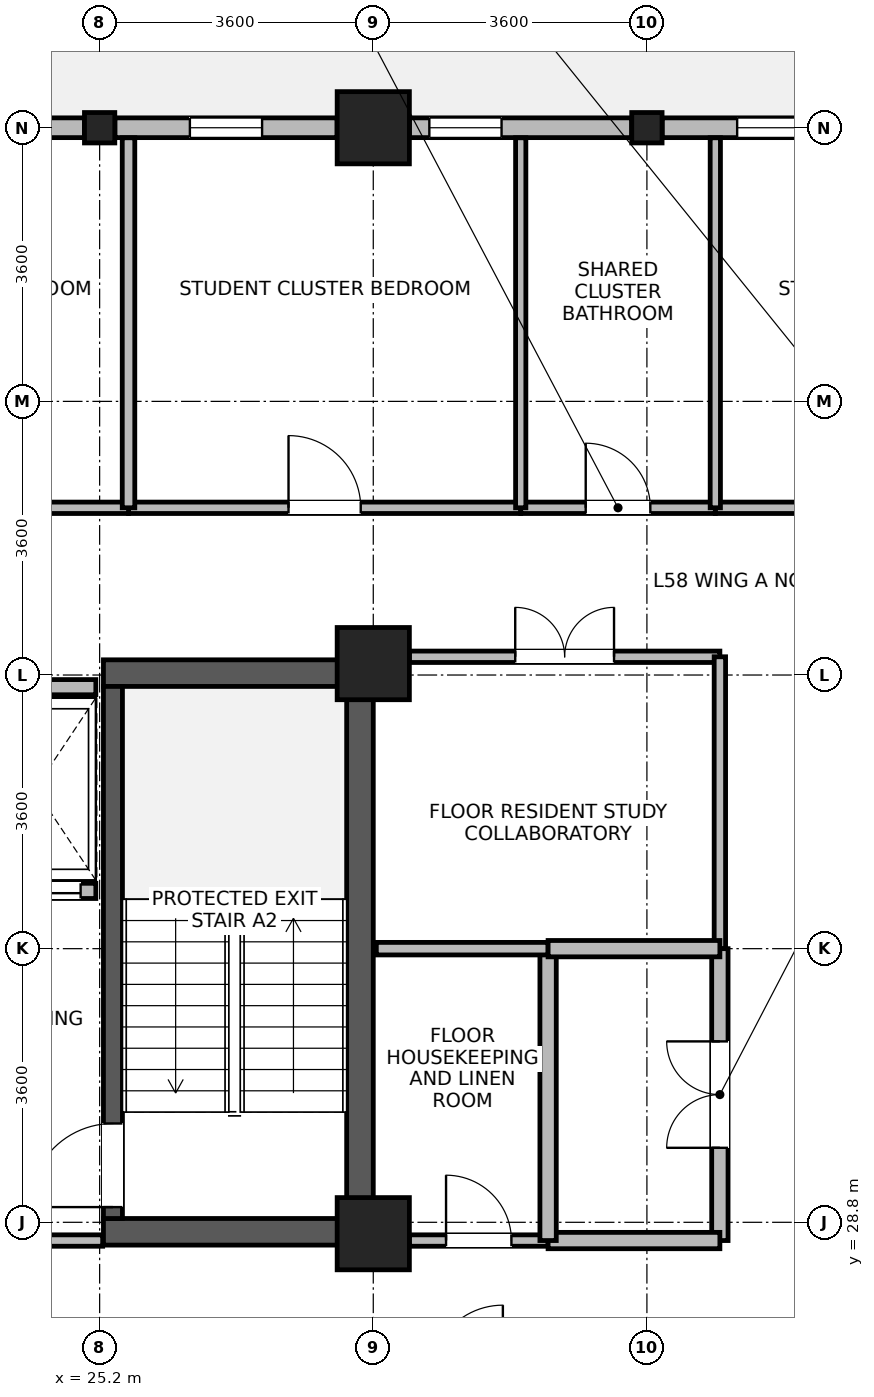
"""IFC4 building model, lengths in metres.
Left out: names, types, materials, properties, quantities, classifications, styles, units other than length and angle.
Written with IfcOpenShell. Run it as: python <this file> out.ifc"""

import sys

from ifc_helpers import new_model, si_unit, direction, frame, frame_2d, origin, origin_2d, place, context, subcontext, project, spatial, rectangle, i_section, extrude, source, transform, mapped, element, fill, save


model = new_model("IFC4")
c1 = context("Model", 3, precision=1e-05, world=origin(), true_north=direction((0.0, 1.0)))
c2 = subcontext(c1, "Body", "Model", "MODEL_VIEW")
j1 = project(units=[si_unit("LENGTHUNIT", "METRE"), si_unit("PLANEANGLEUNIT", "RADIAN")], contexts=[c1])
p1 = place(None, origin())
s1 = spatial("IfcSite", under=j1, at=p1, CompositionType="ELEMENT")
p2 = place(p1, origin())
s2 = spatial("IfcBuilding", under=s1, at=p2, CompositionType="ELEMENT")
p3 = place(p2, frame((0.0, 0.0, 227.7)))
s3 = spatial("IfcBuildingStorey", under=s2, at=p3, CompositionType="ELEMENT", Elevation=227.7)
p4 = place(p3, frame((28.625, 28.5, 0.0), z_axis=(0.0, 0.0, 1.0), x_axis=(0.0, 1.0, 0.0)))
e1 = element("IfcWall", 1, at=p4, inside=s3, PredefinedType="SHEAR", context=c2, shape_type="SweptSolid", body=[
    extrude(rectangle(XDim=7.7, YDim=0.35, at=frame_2d((3.85, 0.0))), origin(), (0.0, 0.0, 1.0), 3.47),
])
for number, where, z_axis, x_axis in (
    (2, (25.25, 28.675, 0.0), (0.0, 0.0, 1.0), (1.0, 0.0, 0.0)),
    (3, (25.25, 36.025, 0.0), (0.0, 0.0, 1.0), (1.0, 0.0, 0.0)),
):
    element("IfcWall", number, at=place(p3, frame(where, z_axis=z_axis, x_axis=x_axis)), inside=s3, PredefinedType="SHEAR", context=c2, shape_type="SweptSolid", body=[
        extrude(rectangle(XDim=3.2, YDim=0.35, at=frame_2d((1.6, 0.0))), origin(), (0.0, 0.0, 1.0), 3.47),
    ])
p5 = place(p3, frame((25.375, 28.85, 0.0), z_axis=(0.0, 0.0, 1.0), x_axis=(0.0, 1.0, 0.0)))
e4 = element("IfcWall", 4, at=p5, inside=s3, PredefinedType="SHEAR", context=c2, shape_type="SweptSolid", body=[
    extrude(rectangle(XDim=7.0, YDim=0.25, at=frame_2d((3.5, 0.0))), origin(), (0.0, 0.0, 1.0), 3.47),
])
p6 = place(p5, frame((0.15, 0.0, 0.0)))
e5 = element("IfcOpeningElement", 5, at=p6, cuts=e4, PredefinedType="OPENING", context=c2, shape_type="SweptSolid", body=[
    extrude(rectangle(XDim=1.1, YDim=2.08, at=frame_2d((0.55, 1.04))), frame((0.0, 0.135, 0.0), z_axis=(0.0, -1.0, 0.0), x_axis=(1.0, 0.0, 0.0)), (0.0, 0.0, 1.0), 0.27),
])
m1 = source(origin(), c2, "Body", "SweptSolid", [
    extrude(rectangle(XDim=0.95, YDim=0.95, at=origin_2d()), origin(), (0.0, 0.0, 1.0), 3.7),
])
for number, where, z_axis, x_axis in (
    (6, (28.8, 28.65, 0.0), (0.0, 0.0, 1.0), (1.0, 0.0, 0.0)),
    (7, (28.8, 36.15, 0.0), (0.0, 0.0, 1.0), (1.0, 0.0, 0.0)),
    (8, (28.8, 43.2, 0.0), (0.0, 0.0, 1.0), (1.0, 0.0, 0.0)),
):
    element("IfcColumn", number, at=place(p3, frame(where, z_axis=z_axis, x_axis=x_axis)), inside=s3, PredefinedType="COLUMN", context=c2, shape_type="MappedRepresentation", body=[
        mapped(m1, transform((0.0, 0.0, 0.0), x_axis=(1.0, 0.0, 0.0), y_axis=(0.0, 1.0, 0.0), z_axis=(0.0, 0.0, 1.0), scale=1.0)),
    ])
m2 = source(origin(), c2, "Body", "SweptSolid", [
    extrude(i_section(OverallWidth=0.399, OverallDepth=0.4, WebThickness=0.017, FlangeThickness=0.023, FilletRadius=0.015, at=origin_2d()), origin(), (0.0, 0.0, 1.0), 3.7),
])
for number, where, z_axis, x_axis in (
    (9, (25.2, 43.2, 0.0), (0.0, 0.0, 1.0), (1.0, 0.0, 0.0)),
    (10, (32.4, 43.2, 0.0), (0.0, 0.0, 1.0), (1.0, 0.0, 0.0)),
):
    element("IfcColumn", number, at=place(p3, frame(where, z_axis=z_axis, x_axis=x_axis)), inside=s3, PredefinedType="COLUMN", context=c2, shape_type="MappedRepresentation", body=[
        mapped(m2, transform((0.0, 0.0, 0.0), x_axis=(1.0, 0.0, 0.0), y_axis=(0.0, 1.0, 0.0), z_axis=(0.0, 0.0, 1.0), scale=1.0)),
    ])
p7 = place(p3, frame((32.601, 43.2, 0.0), z_axis=(0.0, 0.0, 1.0), x_axis=(1.0, 0.0, 0.0)))
e11 = element("IfcWall", 11, at=p7, inside=s3, PredefinedType="STANDARD", context=c2, shape_type="SweptSolid", body=[
    extrude(rectangle(XDim=2.923, YDim=0.26, at=frame_2d((1.462, 0.0))), origin(), (0.0, 0.0, 1.0), 3.05),
])
p8 = place(p7, frame((0.987, 0.0, 0.85)))
e12 = element("IfcOpeningElement", 12, at=p8, cuts=e11, PredefinedType="OPENING", context=c2, shape_type="SweptSolid", body=[
    extrude(rectangle(XDim=0.95, YDim=1.75, at=frame_2d((0.475, 0.875))), frame((0.0, 0.14, 0.0), z_axis=(0.0, -1.0, 0.0), x_axis=(1.0, 0.0, 0.0)), (0.0, 0.0, 1.0), 0.28),
])
p9 = place(p3, frame((29.276, 43.2, 0.0), z_axis=(0.0, 0.0, 1.0), x_axis=(1.0, 0.0, 0.0)))
e13 = element("IfcWall", 13, at=p9, inside=s3, PredefinedType="STANDARD", context=c2, shape_type="SweptSolid", body=[
    extrude(rectangle(XDim=2.924, YDim=0.26, at=frame_2d((1.462, 0.0))), origin(), (0.0, 0.0, 1.0), 3.05),
])
p10 = place(p9, frame((0.262, 0.0, 0.85)))
e14 = element("IfcOpeningElement", 14, at=p10, cuts=e13, PredefinedType="OPENING", context=c2, shape_type="SweptSolid", body=[
    extrude(rectangle(XDim=0.95, YDim=1.75, at=frame_2d((0.475, 0.875))), frame((0.0, 0.14, 0.0), z_axis=(0.0, -1.0, 0.0), x_axis=(1.0, 0.0, 0.0)), (0.0, 0.0, 1.0), 0.28),
])
p11 = place(p3, frame((25.4, 43.2, 0.0), z_axis=(0.0, 0.0, 1.0), x_axis=(1.0, 0.0, 0.0)))
e15 = element("IfcWall", 15, at=p11, inside=s3, PredefinedType="STANDARD", context=c2, shape_type="SweptSolid", body=[
    extrude(rectangle(XDim=2.924, YDim=0.26, at=frame_2d((1.462, 0.0))), origin(), (0.0, 0.0, 1.0), 3.05),
])
p12 = place(p11, frame((0.987, 0.0, 0.85)))
e16 = element("IfcOpeningElement", 16, at=p12, cuts=e15, PredefinedType="OPENING", context=c2, shape_type="SweptSolid", body=[
    extrude(rectangle(XDim=0.95, YDim=1.75, at=frame_2d((0.475, 0.875))), frame((0.0, 0.14, 0.0), z_axis=(0.0, -1.0, 0.0), x_axis=(1.0, 0.0, 0.0)), (0.0, 0.0, 1.0), 0.28),
])
p13 = place(p3, frame((22.076, 43.2, 0.0), z_axis=(0.0, 0.0, 1.0), x_axis=(1.0, 0.0, 0.0)))
e17 = element("IfcWall", 17, at=p13, inside=s3, PredefinedType="STANDARD", context=c2, shape_type="SweptSolid", body=[
    extrude(rectangle(XDim=2.924, YDim=0.26, at=frame_2d((1.462, 0.0))), origin(), (0.0, 0.0, 1.0), 3.05),
])
p14 = place(p13, frame((0.987, 0.0, 0.85)))
e18 = element("IfcOpeningElement", 18, at=p14, cuts=e17, PredefinedType="OPENING", context=c2, shape_type="SweptSolid", body=[
    extrude(rectangle(XDim=0.95, YDim=1.75, at=frame_2d((0.475, 0.875))), frame((0.0, 0.14, 0.0), z_axis=(0.0, -1.0, 0.0), x_axis=(1.0, 0.0, 0.0)), (0.0, 0.0, 1.0), 0.28),
])
p15 = place(p3, frame((23.55, 33.16, 0.0), z_axis=(0.0, 0.0, 1.0), x_axis=(1.0, 0.0, 0.0)))
e19 = element("IfcWall", 19, at=p15, inside=s3, PredefinedType="PARTITIONING", context=c2, shape_type="SweptSolid", body=[
    extrude(rectangle(XDim=1.6, YDim=0.2, at=frame_2d((0.8, 0.0))), origin(), (0.0, 0.0, 1.0), 3.45),
])
p16 = place(p15, frame((0.2, 0.0, 0.0)))
e20 = element("IfcOpeningElement", 20, at=p16, cuts=e19, PredefinedType="OPENING", context=c2, shape_type="SweptSolid", body=[
    extrude(rectangle(XDim=1.2, YDim=2.12, at=frame_2d((0.6, 1.06))), frame((0.0, 0.11, 0.0), z_axis=(0.0, -1.0, 0.0), x_axis=(1.0, 0.0, 0.0)), (0.0, 0.0, 1.0), 0.22),
])
p17 = place(p3, frame((23.55, 35.84, 0.0), z_axis=(0.0, 0.0, 1.0), x_axis=(1.0, 0.0, 0.0)))
e21 = element("IfcWall", 21, at=p17, inside=s3, PredefinedType="PARTITIONING", context=c2, shape_type="SweptSolid", body=[
    extrude(rectangle(XDim=1.6, YDim=0.2, at=frame_2d((0.8, 0.0))), origin(), (0.0, 0.0, 1.0), 2.55),
])
p18 = place(p3, frame((33.3, 38.2, 0.0), z_axis=(0.0, 0.0, 1.0), x_axis=(1.0, 0.0, 0.0)))
e22 = element("IfcWall", 22, at=p18, inside=s3, PredefinedType="PARTITIONING", context=c2, shape_type="SweptSolid", body=[
    extrude(rectangle(XDim=5.5, YDim=0.15, at=frame_2d((2.75, 0.0))), origin(), (0.0, 0.0, 1.0), 3.45),
])
p19 = place(p18, frame((2.275, 0.0, 0.0)))
e23 = element("IfcOpeningElement", 23, at=p19, cuts=e22, PredefinedType="OPENING", context=c2, shape_type="SweptSolid", body=[
    extrude(rectangle(XDim=0.95, YDim=2.1, at=frame_2d((0.475, 1.05))), frame((0.0, 0.085, 0.0), z_axis=(0.0, -1.0, 0.0), x_axis=(1.0, 0.0, 0.0)), (0.0, 0.0, 1.0), 0.17),
])
p20 = place(p3, frame((25.58, 38.2, 0.0), z_axis=(0.0, 0.0, 1.0), x_axis=(1.0, 0.0, 0.0)))
e24 = element("IfcWall", 24, at=p20, inside=s3, PredefinedType="PARTITIONING", context=c2, shape_type="SweptSolid", body=[
    extrude(rectangle(XDim=5.16, YDim=0.15, at=frame_2d((2.58, 0.0))), origin(), (0.0, 0.0, 1.0), 3.45),
])
p21 = place(p20, frame((2.105, 0.0, 0.0)))
e25 = element("IfcOpeningElement", 25, at=p21, cuts=e24, PredefinedType="OPENING", context=c2, shape_type="SweptSolid", body=[
    extrude(rectangle(XDim=0.95, YDim=2.1, at=frame_2d((0.475, 1.05))), frame((0.0, 0.085, 0.0), z_axis=(0.0, -1.0, 0.0), x_axis=(1.0, 0.0, 0.0)), (0.0, 0.0, 1.0), 0.17),
])
p22 = place(p3, frame((20.76, 38.2, 0.0), z_axis=(0.0, 0.0, 1.0), x_axis=(1.0, 0.0, 0.0)))
e26 = element("IfcWall", 26, at=p22, inside=s3, PredefinedType="PARTITIONING", context=c2, shape_type="SweptSolid", body=[
    extrude(rectangle(XDim=4.82, YDim=0.15, at=frame_2d((2.41, 0.0))), origin(), (0.0, 0.0, 1.0), 3.45),
])
p23 = place(p22, frame((1.935, 0.0, 0.0)))
e27 = element("IfcOpeningElement", 27, at=p23, cuts=e26, PredefinedType="OPENING", context=c2, shape_type="SweptSolid", body=[
    extrude(rectangle(XDim=0.95, YDim=2.1, at=frame_2d((0.475, 1.05))), frame((0.0, 0.085, 0.0), z_axis=(0.0, -1.0, 0.0), x_axis=(1.0, 0.0, 0.0)), (0.0, 0.0, 1.0), 0.17),
])
p24 = place(p3, frame((29.275, 36.24, 0.0), z_axis=(0.0, 0.0, 1.0), x_axis=(1.0, 0.0, 0.0)))
e28 = element("IfcWall", 28, at=p24, inside=s3, PredefinedType="PARTITIONING", context=c2, shape_type="SweptSolid", body=[
    extrude(rectangle(XDim=4.085, YDim=0.15, at=frame_2d((2.042, 0.0))), origin(), (0.0, 0.0, 1.0), 2.9),
])
p25 = place(p24, frame((1.393, 0.0, 0.0)))
e29 = element("IfcOpeningElement", 29, at=p25, cuts=e28, PredefinedType="OPENING", context=c2, shape_type="SweptSolid", body=[
    extrude(rectangle(XDim=1.3, YDim=2.12, at=frame_2d((0.65, 1.06))), frame((0.0, 0.085, 0.0), z_axis=(0.0, -1.0, 0.0), x_axis=(1.0, 0.0, 0.0)), (0.0, 0.0, 1.0), 0.17),
])
p26 = place(p3, frame((33.36, 32.4, 0.0), z_axis=(0.0, 0.0, 1.0), x_axis=(0.0, 1.0, 0.0)))
e30 = element("IfcWall", 30, at=p26, inside=s3, PredefinedType="PARTITIONING", context=c2, shape_type="SweptSolid", body=[
    extrude(rectangle(XDim=3.84, YDim=0.15, at=frame_2d((1.92, 0.0))), origin(), (0.0, 0.0, 1.0), 3.45),
])
p27 = place(p3, frame((33.36, 28.56, 0.0), z_axis=(0.0, 0.0, 1.0), x_axis=(0.0, 1.0, 0.0)))
e31 = element("IfcWall", 31, at=p27, inside=s3, PredefinedType="PARTITIONING", context=c2, shape_type="SweptSolid", body=[
    extrude(rectangle(XDim=3.84, YDim=0.215, at=frame_2d((1.92, 0.0))), origin(), (0.0, 0.0, 1.0), 3.45),
])
p28 = place(p27, frame((1.22, 0.0, 0.0)))
e32 = element("IfcOpeningElement", 32, at=p28, cuts=e31, PredefinedType="OPENING", context=c2, shape_type="SweptSolid", body=[
    extrude(rectangle(XDim=1.4, YDim=2.15, at=frame_2d((0.7, 1.075))), frame((0.0, 0.118, 0.0), z_axis=(0.0, -1.0, 0.0), x_axis=(1.0, 0.0, 0.0)), (0.0, 0.0, 1.0), 0.235),
])
p29 = place(p3, frame((30.74, 38.2, 0.0), z_axis=(0.0, 0.0, 1.0), x_axis=(1.0, 0.0, 0.0)))
e33 = element("IfcWall", 33, at=p29, inside=s3, PredefinedType="PARTITIONING", context=c2, shape_type="SweptSolid", body=[
    extrude(rectangle(XDim=2.56, YDim=0.15, at=frame_2d((1.28, 0.0))), origin(), (0.0, 0.0, 1.0), 3.45),
])
p30 = place(p29, frame((0.855, 0.0, 0.0)))
e34 = element("IfcOpeningElement", 34, at=p30, cuts=e33, PredefinedType="OPENING", context=c2, shape_type="SweptSolid", body=[
    extrude(rectangle(XDim=0.85, YDim=2.04, at=frame_2d((0.425, 1.02))), frame((0.0, 0.085, 0.0), z_axis=(0.0, -1.0, 0.0), x_axis=(1.0, 0.0, 0.0)), (0.0, 0.0, 1.0), 0.17),
])
p31 = place(p3, frame((29.275, 28.56, 0.0), z_axis=(0.0, 0.0, 1.0), x_axis=(1.0, 0.0, 0.0)))
e35 = element("IfcWall", 35, at=p31, inside=s3, PredefinedType="PARTITIONING", context=c2, shape_type="SweptSolid", body=[
    extrude(rectangle(XDim=1.825, YDim=0.15, at=frame_2d((0.913, 0.0))), origin(), (0.0, 0.0, 1.0), 2.9),
])
p32 = place(p31, frame((0.482, 0.0, 0.0)))
e36 = element("IfcOpeningElement", 36, at=p32, cuts=e35, PredefinedType="OPENING", context=c2, shape_type="SweptSolid", body=[
    extrude(rectangle(XDim=0.86, YDim=2.02, at=frame_2d((0.43, 1.01))), frame((0.0, 0.085, 0.0), z_axis=(0.0, -1.0, 0.0), x_axis=(1.0, 0.0, 0.0)), (0.0, 0.0, 1.0), 0.17),
])
p33 = place(p3, frame((31.1, 28.56, 0.0), z_axis=(0.0, 0.0, 1.0), x_axis=(1.0, 0.0, 0.0)))
e37 = element("IfcWall", 37, at=p33, inside=s3, PredefinedType="PARTITIONING", context=c2, shape_type="SweptSolid", body=[
    extrude(rectangle(XDim=2.26, YDim=0.215, at=frame_2d((1.13, 0.0))), origin(), (0.0, 0.0, 1.0), 2.9),
])
p34 = place(p3, frame((25.58, 38.2, 0.0), z_axis=(0.0, 0.0, 1.0), x_axis=(0.0, 1.0, 0.0)))
e38 = element("IfcWall", 38, at=p34, inside=s3, PredefinedType="PARTITIONING", context=c2, shape_type="SweptSolid", body=[
    extrude(rectangle(XDim=4.868, YDim=0.165, at=frame_2d((2.434, 0.0))), origin(), (0.0, 0.0, 1.0), 3.45),
])
for number, where, z_axis, x_axis in (
    (39, (30.74, 38.2, 0.0), (0.0, 0.0, 1.0), (0.0, 1.0, 0.0)),
    (40, (33.3, 38.2, 0.0), (0.0, 0.0, 1.0), (0.0, 1.0, 0.0)),
):
    element("IfcWall", number, at=place(p3, frame(where, z_axis=z_axis, x_axis=x_axis)), inside=s3, PredefinedType="PARTITIONING", context=c2, shape_type="SweptSolid", body=[
        extrude(rectangle(XDim=4.868, YDim=0.135, at=frame_2d((2.434, 0.0))), origin(), (0.0, 0.0, 1.0), 3.45),
    ])
p35 = place(p3, frame((31.1, 28.56, 0.0), z_axis=(0.0, 0.0, 1.0), x_axis=(0.0, 1.0, 0.0)))
e41 = element("IfcWall", 41, at=p35, inside=s3, PredefinedType="PARTITIONING", context=c2, shape_type="SweptSolid", body=[
    extrude(rectangle(XDim=3.84, YDim=0.215, at=frame_2d((1.92, 0.0))), origin(), (0.0, 0.0, 1.0), 3.45),
])
p36 = place(p3, frame((21.76, 28.56, 0.0), z_axis=(0.0, 0.0, 1.0), x_axis=(1.0, 0.0, 0.0)))
e42 = element("IfcWall", 42, at=p36, inside=s3, PredefinedType="PARTITIONING", context=c2, shape_type="SweptSolid", body=[
    extrude(rectangle(XDim=3.48, YDim=0.15, at=frame_2d((1.74, 0.0))), origin(), (0.0, 0.0, 1.0), 2.55),
])
p37 = place(p36, frame((0.99, 0.0, 0.0)))
e43 = element("IfcOpeningElement", 43, at=p37, cuts=e42, PredefinedType="OPENING", context=c2, shape_type="SweptSolid", body=[
    extrude(rectangle(XDim=1.5, YDim=2.1, at=frame_2d((0.75, 1.05))), frame((0.0, 0.085, 0.0), z_axis=(0.0, -1.0, 0.0), x_axis=(1.0, 0.0, 0.0)), (0.0, 0.0, 1.0), 0.17),
])
p38 = place(p3, frame((28.84, 32.4, 0.0), z_axis=(0.0, 0.0, 1.0), x_axis=(1.0, 0.0, 0.0)))
e44 = element("IfcWall", 44, at=p38, inside=s3, PredefinedType="PARTITIONING", context=c2, shape_type="SweptSolid", body=[
    extrude(rectangle(XDim=2.26, YDim=0.165, at=frame_2d((1.13, 0.0))), origin(), (0.0, 0.0, 1.0), 3.45),
])
p39 = place(p3, frame((31.1, 32.4, 0.0), z_axis=(0.0, 0.0, 1.0), x_axis=(1.0, 0.0, 0.0)))
e45 = element("IfcWall", 45, at=p39, inside=s3, PredefinedType="PARTITIONING", context=c2, shape_type="SweptSolid", body=[
    extrude(rectangle(XDim=2.26, YDim=0.215, at=frame_2d((1.13, 0.0))), origin(), (0.0, 0.0, 1.0), 3.45),
])
p40 = place(p8, origin())
e46 = element("IfcWindow", 46, at=p40, inside=s3, PartitioningType="SINGLE_PANEL", PredefinedType="WINDOW", context=c2, shape_type="SweptSolid", body=[
    extrude(rectangle(XDim=0.95, YDim=1.75, at=frame_2d((0.475, 0.875))), frame((0.0, 0.03, 0.0), z_axis=(0.0, -1.0, 0.0), x_axis=(1.0, 0.0, 0.0)), (0.0, 0.0, 1.0), 0.06),
])
fill(e12, e46)
p41 = place(p10, origin())
e47 = element("IfcWindow", 47, at=p41, inside=s3, PartitioningType="SINGLE_PANEL", PredefinedType="WINDOW", context=c2, shape_type="SweptSolid", body=[
    extrude(rectangle(XDim=0.95, YDim=1.75, at=frame_2d((0.475, 0.875))), frame((0.0, 0.03, 0.0), z_axis=(0.0, -1.0, 0.0), x_axis=(1.0, 0.0, 0.0)), (0.0, 0.0, 1.0), 0.06),
])
fill(e14, e47)
p42 = place(p12, origin())
e48 = element("IfcWindow", 48, at=p42, inside=s3, PartitioningType="SINGLE_PANEL", PredefinedType="WINDOW", context=c2, shape_type="SweptSolid", body=[
    extrude(rectangle(XDim=0.95, YDim=1.75, at=frame_2d((0.475, 0.875))), frame((0.0, 0.03, 0.0), z_axis=(0.0, -1.0, 0.0), x_axis=(1.0, 0.0, 0.0)), (0.0, 0.0, 1.0), 0.06),
])
fill(e16, e48)
p43 = place(p6, origin())
e49 = element("IfcDoor", 49, at=p43, inside=s3, OperationType="SINGLE_SWING_LEFT", PredefinedType="DOOR", context=c2, shape_type="SweptSolid", body=[
    extrude(rectangle(XDim=1.1, YDim=2.08, at=frame_2d((0.55, 1.04))), frame((0.0, 0.025, 0.0), z_axis=(0.0, -1.0, 0.0), x_axis=(1.0, 0.0, 0.0)), (0.0, 0.0, 1.0), 0.05),
])
fill(e5, e49)
p44 = place(p16, origin())
e50 = element("IfcDoor", 50, at=p44, inside=s3, OperationType="SLIDING_TO_RIGHT", PredefinedType="DOOR", context=c2, shape_type="SweptSolid", body=[
    extrude(rectangle(XDim=1.2, YDim=2.12, at=frame_2d((0.6, 1.06))), frame((0.0, 0.025, 0.0), z_axis=(0.0, -1.0, 0.0), x_axis=(1.0, 0.0, 0.0)), (0.0, 0.0, 1.0), 0.05),
])
fill(e20, e50)
p45 = place(p21, origin())
e51 = element("IfcDoor", 51, at=p45, inside=s3, OperationType="SINGLE_SWING_LEFT", PredefinedType="DOOR", context=c2, shape_type="SweptSolid", body=[
    extrude(rectangle(XDim=0.95, YDim=2.1, at=frame_2d((0.475, 1.05))), frame((0.0, 0.025, 0.0), z_axis=(0.0, -1.0, 0.0), x_axis=(1.0, 0.0, 0.0)), (0.0, 0.0, 1.0), 0.05),
])
fill(e25, e51)
p46 = place(p25, origin())
e52 = element("IfcDoor", 52, at=p46, inside=s3, OperationType="DOUBLE_DOOR_SINGLE_SWING", PredefinedType="DOOR", context=c2, shape_type="SweptSolid", body=[
    extrude(rectangle(XDim=1.3, YDim=2.12, at=frame_2d((0.65, 1.06))), frame((0.0, 0.025, 0.0), z_axis=(0.0, -1.0, 0.0), x_axis=(1.0, 0.0, 0.0)), (0.0, 0.0, 1.0), 0.05),
])
fill(e29, e52)
p47 = place(p28, origin())
e53 = element("IfcDoor", 53, at=p47, inside=s3, OperationType="DOUBLE_DOOR_SINGLE_SWING", PredefinedType="DOOR", context=c2, shape_type="SweptSolid", body=[
    extrude(rectangle(XDim=1.4, YDim=2.15, at=frame_2d((0.7, 1.075))), frame((0.0, 0.025, 0.0), z_axis=(0.0, -1.0, 0.0), x_axis=(1.0, 0.0, 0.0)), (0.0, 0.0, 1.0), 0.05),
])
fill(e32, e53)
p48 = place(p30, origin())
e54 = element("IfcDoor", 54, at=p48, inside=s3, OperationType="SINGLE_SWING_LEFT", PredefinedType="DOOR", context=c2, shape_type="SweptSolid", body=[
    extrude(rectangle(XDim=0.85, YDim=2.04, at=frame_2d((0.425, 1.02))), frame((0.0, 0.025, 0.0), z_axis=(0.0, -1.0, 0.0), x_axis=(1.0, 0.0, 0.0)), (0.0, 0.0, 1.0), 0.05),
])
fill(e34, e54)
p49 = place(p32, origin())
e55 = element("IfcDoor", 55, at=p49, inside=s3, OperationType="SINGLE_SWING_LEFT", PredefinedType="DOOR", context=c2, shape_type="SweptSolid", body=[
    extrude(rectangle(XDim=0.86, YDim=2.02, at=frame_2d((0.43, 1.01))), frame((0.0, 0.025, 0.0), z_axis=(0.0, -1.0, 0.0), x_axis=(1.0, 0.0, 0.0)), (0.0, 0.0, 1.0), 0.05),
])
fill(e36, e55)
save(model, sys.argv[1])
